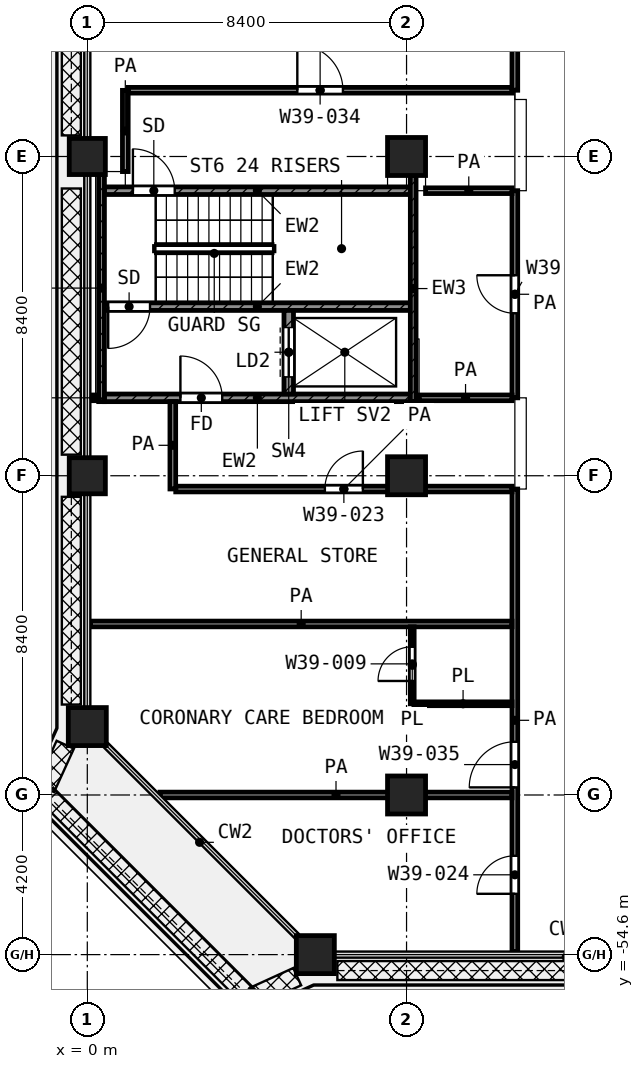
"""IFC4 building model, lengths in metres.
Left out: names, types, materials, properties, quantities, classifications, styles, units other than length and angle.
Written with IfcOpenShell. Run it as: python <this file> out.ifc"""

import sys

from ifc_helpers import new_model, si_unit, direction, frame, frame_2d, origin, origin_2d, place, context, subcontext, project, spatial, rectangle, extrude, element, fill, save


model = new_model("IFC4")
c1 = context("Model", 3, precision=1e-05, world=origin(), true_north=direction((0.0, 1.0)))
c2 = subcontext(c1, "Body", "Model", "MODEL_VIEW")
j1 = project(units=[si_unit("LENGTHUNIT", "METRE"), si_unit("PLANEANGLEUNIT", "RADIAN")], contexts=[c1])
p1 = place(None, origin())
s1 = spatial("IfcSite", under=j1, at=p1, CompositionType="ELEMENT")
p2 = place(p1, origin())
s2 = spatial("IfcBuilding", under=s1, at=p2, CompositionType="ELEMENT")
p3 = place(p2, frame((0.0, 0.0, 192.0)))
s3 = spatial("IfcBuildingStorey", under=s2, at=p3, CompositionType="ELEMENT", Elevation=192.0)
p4 = place(p3, frame((0.0, -33.6, 0.0), z_axis=(0.0, 0.0, 1.0), x_axis=(1.0, 0.0, 0.0)))
e1 = element("IfcColumn", 1, at=p4, inside=s3, PredefinedType="COLUMN", context=c2, shape_type="SweptSolid", body=[
    extrude(rectangle(XDim=0.95, YDim=0.95, at=origin_2d()), origin(), (0.0, 0.0, 1.0), 4.2),
])
p5 = place(p3, frame((8.4, -33.6, 0.0), z_axis=(0.0, 0.0, 1.0), x_axis=(1.0, 0.0, 0.0)))
e2 = element("IfcColumn", 2, at=p5, inside=s3, PredefinedType="COLUMN", context=c2, shape_type="SweptSolid", body=[
    extrude(rectangle(XDim=1.0, YDim=1.0, at=origin_2d()), origin(), (0.0, 0.0, 1.0), 4.2),
])
p6 = place(p3, frame((0.0, -42.0, 0.0), z_axis=(0.0, 0.0, 1.0), x_axis=(1.0, 0.0, 0.0)))
e3 = element("IfcColumn", 3, at=p6, inside=s3, PredefinedType="COLUMN", context=c2, shape_type="SweptSolid", body=[
    extrude(rectangle(XDim=0.95, YDim=0.95, at=origin_2d()), origin(), (0.0, 0.0, 1.0), 4.2),
])
for number, where, z_axis, x_axis in (
    (4, (8.4, -42.0, 0.0), (0.0, 0.0, 1.0), (1.0, 0.0, 0.0)),
    (5, (0.0, -48.6, 0.0), (0.0, 0.0, 1.0), (1.0, 0.0, 0.0)),
    (6, (8.4, -50.4, 0.0), (0.0, 0.0, 1.0), (1.0, 0.0, 0.0)),
    (7, (6.0, -54.6, 0.0), (0.0, 0.0, 1.0), (1.0, 0.0, 0.0)),
):
    element("IfcColumn", number, at=place(p3, frame(where, z_axis=z_axis, x_axis=x_axis)), inside=s3, PredefinedType="COLUMN", context=c2, shape_type="SweptSolid", body=[
        extrude(rectangle(XDim=1.0, YDim=1.0, at=origin_2d()), origin(), (0.0, 0.0, 1.0), 4.2),
    ])
p7 = place(p3, frame((0.375, -40.05, 0.0), z_axis=(0.0, 0.0, 1.0), x_axis=(0.0, 1.0, 0.0)))
e8 = element("IfcWall", 8, at=p7, inside=s3, PredefinedType="SHEAR", context=c2, shape_type="SweptSolid", body=[
    extrude(rectangle(XDim=5.975, YDim=0.15, at=frame_2d((2.988, 0.0))), origin(), (0.0, 0.0, 1.0), 3.6),
])
p8 = place(p3, frame((8.575, -40.05, 0.0), z_axis=(0.0, 0.0, 1.0), x_axis=(0.0, 1.0, 0.0)))
e9 = element("IfcWall", 9, at=p8, inside=s3, PredefinedType="SHEAR", context=c2, shape_type="SweptSolid", body=[
    extrude(rectangle(XDim=5.95, YDim=0.15, at=frame_2d((2.975, 0.0))), origin(), (0.0, 0.0, 1.0), 3.6),
])
p9 = place(p3, frame((0.45, -34.5, 0.0), z_axis=(0.0, 0.0, 1.0), x_axis=(1.0, 0.0, 0.0)))
e10 = element("IfcWall", 10, at=p9, inside=s3, PredefinedType="SHEAR", context=c2, shape_type="SweptSolid", body=[
    extrude(rectangle(XDim=8.05, YDim=0.2, at=frame_2d((4.025, 0.0))), origin(), (0.0, 0.0, 1.0), 3.6),
])
p10 = place(p9, frame((0.75, 0.0, 0.0)))
e11 = element("IfcOpeningElement", 11, at=p10, cuts=e10, PredefinedType="OPENING", context=c2, shape_type="SweptSolid", body=[
    extrude(rectangle(XDim=1.1, YDim=2.1, at=frame_2d((0.55, 1.05))), frame((0.0, 0.11, 0.0), z_axis=(0.0, -1.0, 0.0), x_axis=(1.0, 0.0, 0.0)), (0.0, 0.0, 1.0), 0.22),
])
p11 = place(p3, frame((0.45, -37.55, 0.0), z_axis=(0.0, 0.0, 1.0), x_axis=(1.0, 0.0, 0.0)))
e12 = element("IfcWall", 12, at=p11, inside=s3, PredefinedType="SHEAR", context=c2, shape_type="SweptSolid", body=[
    extrude(rectangle(XDim=8.05, YDim=0.2, at=frame_2d((4.025, 0.0))), origin(), (0.0, 0.0, 1.0), 3.6),
])
p12 = place(p11, frame((0.1, 0.0, 0.0)))
e13 = element("IfcOpeningElement", 13, at=p12, cuts=e12, PredefinedType="OPENING", context=c2, shape_type="SweptSolid", body=[
    extrude(rectangle(XDim=1.1, YDim=2.1, at=frame_2d((0.55, 1.05))), frame((0.0, 0.11, 0.0), z_axis=(0.0, -1.0, 0.0), x_axis=(1.0, 0.0, 0.0)), (0.0, 0.0, 1.0), 0.22),
])
p13 = place(p3, frame((0.45, -39.95, 0.0), z_axis=(0.0, 0.0, 1.0), x_axis=(1.0, 0.0, 0.0)))
e14 = element("IfcWall", 14, at=p13, inside=s3, PredefinedType="SHEAR", context=c2, shape_type="SweptSolid", body=[
    extrude(rectangle(XDim=8.05, YDim=0.2, at=frame_2d((4.025, 0.0))), origin(), (0.0, 0.0, 1.0), 3.6),
])
p14 = place(p13, frame((2.0, 0.0, 0.0)))
e15 = element("IfcOpeningElement", 15, at=p14, cuts=e14, PredefinedType="OPENING", context=c2, shape_type="SweptSolid", body=[
    extrude(rectangle(XDim=1.1, YDim=2.1, at=frame_2d((0.55, 1.05))), frame((0.0, 0.11, 0.0), z_axis=(0.0, -1.0, 0.0), x_axis=(1.0, 0.0, 0.0)), (0.0, 0.0, 1.0), 0.22),
])
p15 = place(p3, frame((5.3, -39.85, 0.0), z_axis=(0.0, 0.0, 1.0), x_axis=(0.0, 1.0, 0.0)))
e16 = element("IfcWall", 16, at=p15, inside=s3, PredefinedType="SHEAR", context=c2, shape_type="SweptSolid", body=[
    extrude(rectangle(XDim=2.2, YDim=0.25, at=frame_2d((1.1, 0.0))), origin(), (0.0, 0.0, 1.0), 3.6),
])
p16 = place(p15, frame((0.45, 0.0, 0.0)))
e17 = element("IfcOpeningElement", 17, at=p16, cuts=e16, PredefinedType="OPENING", context=c2, shape_type="SweptSolid", body=[
    extrude(rectangle(XDim=1.3, YDim=2.1, at=frame_2d((0.65, 1.05))), frame((0.0, 0.135, 0.0), z_axis=(0.0, -1.0, 0.0), x_axis=(1.0, 0.0, 0.0)), (0.0, 0.0, 1.0), 0.27),
])
p17 = place(p3, frame((8.6, -48.0, 0.0), z_axis=(0.0, 0.0, 1.0), x_axis=(1.0, 0.0, 0.0)))
e18 = element("IfcWall", 18, at=p17, inside=s3, PredefinedType="PARTITIONING", context=c2, shape_type="SweptSolid", body=[
    extrude(rectangle(XDim=2.575, YDim=0.1, at=frame_2d((1.288, 0.0))), origin(), (0.0, 0.0, 1.0), 3.6),
])
p18 = place(p3, frame((8.55, -48.0, 0.0), z_axis=(0.0, 0.0, 1.0), x_axis=(0.0, 1.0, 0.0)))
e19 = element("IfcWall", 19, at=p18, inside=s3, PredefinedType="PARTITIONING", context=c2, shape_type="SweptSolid", body=[
    extrude(rectangle(XDim=2.025, YDim=0.1, at=frame_2d((1.012, 0.0))), origin(), (0.0, 0.0, 1.0), 3.6),
])
p19 = place(p18, frame((0.6, 0.0, 0.0)))
e20 = element("IfcOpeningElement", 20, at=p19, cuts=e19, PredefinedType="OPENING", context=c2, shape_type="SweptSolid", body=[
    extrude(rectangle(XDim=0.9, YDim=2.1, at=frame_2d((0.45, 1.05))), frame((0.0, 0.06, 0.0), z_axis=(0.0, -1.0, 0.0), x_axis=(1.0, 0.0, 0.0)), (0.0, 0.0, 1.0), 0.12),
])
p20 = place(p3, frame((1.913, -50.4, 0.0), z_axis=(0.0, 0.0, 1.0), x_axis=(1.0, 0.0, 0.0)))
e21 = element("IfcWall", 21, at=p20, inside=s3, PredefinedType="PARTITIONING", context=c2, shape_type="SweptSolid", body=[
    extrude(rectangle(XDim=9.262, YDim=0.15, at=frame_2d((4.631, 0.0))), origin(), (0.0, 0.0, 1.0), 3.6),
])
p21 = place(p3, frame((0.08, -45.9, 0.0), z_axis=(0.0, 0.0, 1.0), x_axis=(1.0, 0.0, 0.0)))
e22 = element("IfcWall", 22, at=p21, inside=s3, PredefinedType="PARTITIONING", context=c2, shape_type="SweptSolid", body=[
    extrude(rectangle(XDim=11.095, YDim=0.15, at=frame_2d((5.547, 0.0))), origin(), (0.0, 0.0, 1.0), 3.6),
])
p22 = place(p3, frame((2.327, -42.35, 0.0), z_axis=(0.0, 0.0, 1.0), x_axis=(1.0, 0.0, 0.0)))
e23 = element("IfcWall", 23, at=p22, inside=s3, PredefinedType="PARTITIONING", context=c2, shape_type="SweptSolid", body=[
    extrude(rectangle(XDim=8.848, YDim=0.15, at=frame_2d((4.424, 0.0))), origin(), (0.0, 0.0, 1.0), 3.6),
])
p23 = place(p22, frame((3.924, 0.0, 0.0)))
e24 = element("IfcOpeningElement", 24, at=p23, cuts=e23, PredefinedType="OPENING", context=c2, shape_type="SweptSolid", body=[
    extrude(rectangle(XDim=1.0, YDim=2.1, at=frame_2d((0.5, 1.05))), frame((0.0, 0.085, 0.0), z_axis=(0.0, -1.0, 0.0), x_axis=(1.0, 0.0, 0.0)), (0.0, 0.0, 1.0), 0.17),
])
p24 = place(p3, frame((0.08, -39.95, 0.0), z_axis=(0.0, 0.0, 1.0), x_axis=(1.0, 0.0, 0.0)))
e25 = element("IfcWall", 25, at=p24, inside=s3, PredefinedType="PARTITIONING", context=c2, shape_type="SweptSolid", body=[
    extrude(rectangle(XDim=0.19, YDim=0.15, at=frame_2d((0.095, 0.0))), origin(), (0.0, 0.0, 1.0), 3.6),
])
p25 = place(p3, frame((8.73, -39.95, 0.0), z_axis=(0.0, 0.0, 1.0), x_axis=(1.0, 0.0, 0.0)))
e26 = element("IfcWall", 26, at=p25, inside=s3, PredefinedType="PARTITIONING", context=c2, shape_type="SweptSolid", body=[
    extrude(rectangle(XDim=2.445, YDim=0.15, at=frame_2d((1.223, 0.0))), origin(), (0.0, 0.0, 1.0), 3.6),
])
p26 = place(p3, frame((8.9, -34.5, 0.0), z_axis=(0.0, 0.0, 1.0), x_axis=(1.0, 0.0, 0.0)))
e27 = element("IfcWall", 27, at=p26, inside=s3, PredefinedType="PARTITIONING", context=c2, shape_type="SweptSolid", body=[
    extrude(rectangle(XDim=2.275, YDim=0.15, at=frame_2d((1.138, 0.0))), origin(), (0.0, 0.0, 1.0), 3.6),
])
p27 = place(p3, frame((1.077, -31.857, 0.0), z_axis=(0.0, 0.0, 1.0), x_axis=(1.0, 0.0, 0.0)))
e28 = element("IfcWall", 28, at=p27, inside=s3, PredefinedType="PARTITIONING", context=c2, shape_type="SweptSolid", body=[
    extrude(rectangle(XDim=10.098, YDim=0.15, at=frame_2d((5.049, 0.0))), origin(), (0.0, 0.0, 1.0), 3.6),
])
p28 = place(p27, frame((4.449, 0.0, 0.0)))
e29 = element("IfcOpeningElement", 29, at=p28, cuts=e28, PredefinedType="OPENING", context=c2, shape_type="SweptSolid", body=[
    extrude(rectangle(XDim=1.2, YDim=2.1, at=frame_2d((0.6, 1.05))), frame((0.0, 0.085, 0.0), z_axis=(0.0, -1.0, 0.0), x_axis=(1.0, 0.0, 0.0)), (0.0, 0.0, 1.0), 0.17),
])
p29 = place(p3, frame((1.0, -33.997, 0.0), z_axis=(0.0, 0.0, 1.0), x_axis=(0.0, 1.0, 0.0)))
e30 = element("IfcWall", 30, at=p29, inside=s3, PredefinedType="PARTITIONING", context=c2, shape_type="SweptSolid", body=[
    extrude(rectangle(XDim=2.137, YDim=0.15, at=frame_2d((1.068, 0.0))), origin(), (0.0, 0.0, 1.0), 3.6),
])
p30 = place(p3, frame((2.25, -42.348, 0.0), z_axis=(0.0, 0.0, 1.0), x_axis=(0.0, 1.0, 0.0)))
e31 = element("IfcWall", 31, at=p30, inside=s3, PredefinedType="PARTITIONING", context=c2, shape_type="SweptSolid", body=[
    extrude(rectangle(XDim=2.298, YDim=0.15, at=frame_2d((1.149, 0.0))), origin(), (0.0, 0.0, 1.0), 3.6),
])
p31 = place(p3, frame((11.25, -54.52, 0.0), z_axis=(0.0, 0.0, 1.0), x_axis=(0.0, 1.0, 0.0)))
e32 = element("IfcWall", 32, at=p31, inside=s3, PredefinedType="PARTITIONING", context=c2, shape_type="SweptSolid", body=[
    extrude(rectangle(XDim=12.17, YDim=0.15, at=frame_2d((6.085, 0.0))), origin(), (0.0, 0.0, 1.0), 3.6),
])
p32 = place(p31, frame((4.32, 0.0, 0.0)))
e33 = element("IfcOpeningElement", 33, at=p32, cuts=e32, PredefinedType="OPENING", context=c2, shape_type="SweptSolid", body=[
    extrude(rectangle(XDim=1.2, YDim=2.1, at=frame_2d((0.6, 1.05))), frame((0.0, 0.085, 0.0), z_axis=(0.0, -1.0, 0.0), x_axis=(1.0, 0.0, 0.0)), (0.0, 0.0, 1.0), 0.17),
])
p33 = place(p31, frame((1.52, 0.0, 0.0)))
e34 = element("IfcOpeningElement", 34, at=p33, cuts=e32, PredefinedType="OPENING", context=c2, shape_type="SweptSolid", body=[
    extrude(rectangle(XDim=1.0, YDim=2.1, at=frame_2d((0.5, 1.05))), frame((0.0, 0.085, 0.0), z_axis=(0.0, -1.0, 0.0), x_axis=(1.0, 0.0, 0.0)), (0.0, 0.0, 1.0), 0.17),
])
p34 = place(p3, frame((11.25, -39.95, 0.0), z_axis=(0.0, 0.0, 1.0), x_axis=(0.0, 1.0, 0.0)))
e35 = element("IfcWall", 35, at=p34, inside=s3, PredefinedType="PARTITIONING", context=c2, shape_type="SweptSolid", body=[
    extrude(rectangle(XDim=5.45, YDim=0.15, at=frame_2d((2.725, 0.0))), origin(), (0.0, 0.0, 1.0), 3.6),
])
p35 = place(p34, frame((2.225, 0.0, 0.0)))
e36 = element("IfcOpeningElement", 36, at=p35, cuts=e35, PredefinedType="OPENING", context=c2, shape_type="SweptSolid", body=[
    extrude(rectangle(XDim=1.0, YDim=2.1, at=frame_2d((0.5, 1.05))), frame((0.0, 0.085, 0.0), z_axis=(0.0, -1.0, 0.0), x_axis=(1.0, 0.0, 0.0)), (0.0, 0.0, 1.0), 0.17),
])
p36 = place(p3, frame((11.25, -31.857, 0.0), z_axis=(0.0, 0.0, 1.0), x_axis=(0.0, 1.0, 0.0)))
e37 = element("IfcWall", 37, at=p36, inside=s3, PredefinedType="PARTITIONING", context=c2, shape_type="SweptSolid", body=[
    extrude(rectangle(XDim=2.457, YDim=0.15, at=frame_2d((1.229, 0.0))), origin(), (0.0, 0.0, 1.0), 3.6),
])
p37 = place(p10, origin())
e38 = element("IfcDoor", 38, at=p37, inside=s3, OperationType="SINGLE_SWING_LEFT", PredefinedType="DOOR", context=c2, shape_type="SweptSolid", body=[
    extrude(rectangle(XDim=1.1, YDim=2.1, at=frame_2d((0.55, 1.05))), frame((0.0, 0.025, 0.0), z_axis=(0.0, -1.0, 0.0), x_axis=(1.0, 0.0, 0.0)), (0.0, 0.0, 1.0), 0.05),
])
fill(e11, e38)
p38 = place(p12, frame((1.1, 0.0, 0.0), z_axis=(0.0, 0.0, 1.0), x_axis=(-1.0, 0.0, 0.0)))
e39 = element("IfcDoor", 39, at=p38, inside=s3, OperationType="SINGLE_SWING_LEFT", PredefinedType="DOOR", context=c2, shape_type="SweptSolid", body=[
    extrude(rectangle(XDim=1.1, YDim=2.1, at=frame_2d((0.55, 1.05))), frame((0.0, 0.025, 0.0), z_axis=(0.0, -1.0, 0.0), x_axis=(1.0, 0.0, 0.0)), (0.0, 0.0, 1.0), 0.05),
])
fill(e13, e39)
p39 = place(p16, origin())
e40 = element("IfcDoor", 40, at=p39, inside=s3, OperationType="DOUBLE_DOOR_SLIDING", PredefinedType="DOOR", context=c2, shape_type="SweptSolid", body=[
    extrude(rectangle(XDim=1.3, YDim=2.1, at=frame_2d((0.65, 1.05))), frame((0.0, 0.025, 0.0), z_axis=(0.0, -1.0, 0.0), x_axis=(1.0, 0.0, 0.0)), (0.0, 0.0, 1.0), 0.05),
])
fill(e17, e40)
p40 = place(p14, origin())
e41 = element("IfcDoor", 41, at=p40, inside=s3, OperationType="SINGLE_SWING_LEFT", PredefinedType="DOOR", context=c2, shape_type="SweptSolid", body=[
    extrude(rectangle(XDim=1.1, YDim=2.1, at=frame_2d((0.55, 1.05))), frame((0.0, 0.025, 0.0), z_axis=(0.0, -1.0, 0.0), x_axis=(1.0, 0.0, 0.0)), (0.0, 0.0, 1.0), 0.05),
])
fill(e15, e41)
p41 = place(p28, origin())
e42 = element("IfcDoor", 42, at=p41, inside=s3, OperationType="SINGLE_SWING_LEFT", PredefinedType="DOOR", context=c2, shape_type="SweptSolid", body=[
    extrude(rectangle(XDim=1.2, YDim=2.1, at=frame_2d((0.6, 1.05))), frame((0.0, 0.025, 0.0), z_axis=(0.0, -1.0, 0.0), x_axis=(1.0, 0.0, 0.0)), (0.0, 0.0, 1.0), 0.05),
])
fill(e29, e42)
p42 = place(p35, origin())
e43 = element("IfcDoor", 43, at=p42, inside=s3, OperationType="SINGLE_SWING_RIGHT", PredefinedType="DOOR", context=c2, shape_type="SweptSolid", body=[
    extrude(rectangle(XDim=1.0, YDim=2.1, at=frame_2d((0.5, 1.05))), frame((0.0, 0.025, 0.0), z_axis=(0.0, -1.0, 0.0), x_axis=(1.0, 0.0, 0.0)), (0.0, 0.0, 1.0), 0.05),
])
fill(e36, e43)
p43 = place(p23, origin())
e44 = element("IfcDoor", 44, at=p43, inside=s3, OperationType="SINGLE_SWING_RIGHT", PredefinedType="DOOR", context=c2, shape_type="SweptSolid", body=[
    extrude(rectangle(XDim=1.0, YDim=2.1, at=frame_2d((0.5, 1.05))), frame((0.0, 0.025, 0.0), z_axis=(0.0, -1.0, 0.0), x_axis=(1.0, 0.0, 0.0)), (0.0, 0.0, 1.0), 0.05),
])
fill(e24, e44)
p44 = place(p32, origin())
e45 = element("IfcDoor", 45, at=p44, inside=s3, OperationType="SINGLE_SWING_LEFT", PredefinedType="DOOR", context=c2, shape_type="SweptSolid", body=[
    extrude(rectangle(XDim=1.2, YDim=2.1, at=frame_2d((0.6, 1.05))), frame((0.0, 0.025, 0.0), z_axis=(0.0, -1.0, 0.0), x_axis=(1.0, 0.0, 0.0)), (0.0, 0.0, 1.0), 0.05),
])
fill(e33, e45)
p45 = place(p19, origin())
e46 = element("IfcDoor", 46, at=p45, inside=s3, OperationType="SINGLE_SWING_LEFT", PredefinedType="DOOR", context=c2, shape_type="SweptSolid", body=[
    extrude(rectangle(XDim=0.9, YDim=2.1, at=frame_2d((0.45, 1.05))), frame((0.0, 0.025, 0.0), z_axis=(0.0, -1.0, 0.0), x_axis=(1.0, 0.0, 0.0)), (0.0, 0.0, 1.0), 0.05),
])
fill(e20, e46)
p46 = place(p33, origin())
e47 = element("IfcDoor", 47, at=p46, inside=s3, OperationType="SINGLE_SWING_LEFT", PredefinedType="DOOR", context=c2, shape_type="SweptSolid", body=[
    extrude(rectangle(XDim=1.0, YDim=2.1, at=frame_2d((0.5, 1.05))), frame((0.0, 0.025, 0.0), z_axis=(0.0, -1.0, 0.0), x_axis=(1.0, 0.0, 0.0)), (0.0, 0.0, 1.0), 0.05),
])
fill(e34, e47)
save(model, sys.argv[1])
